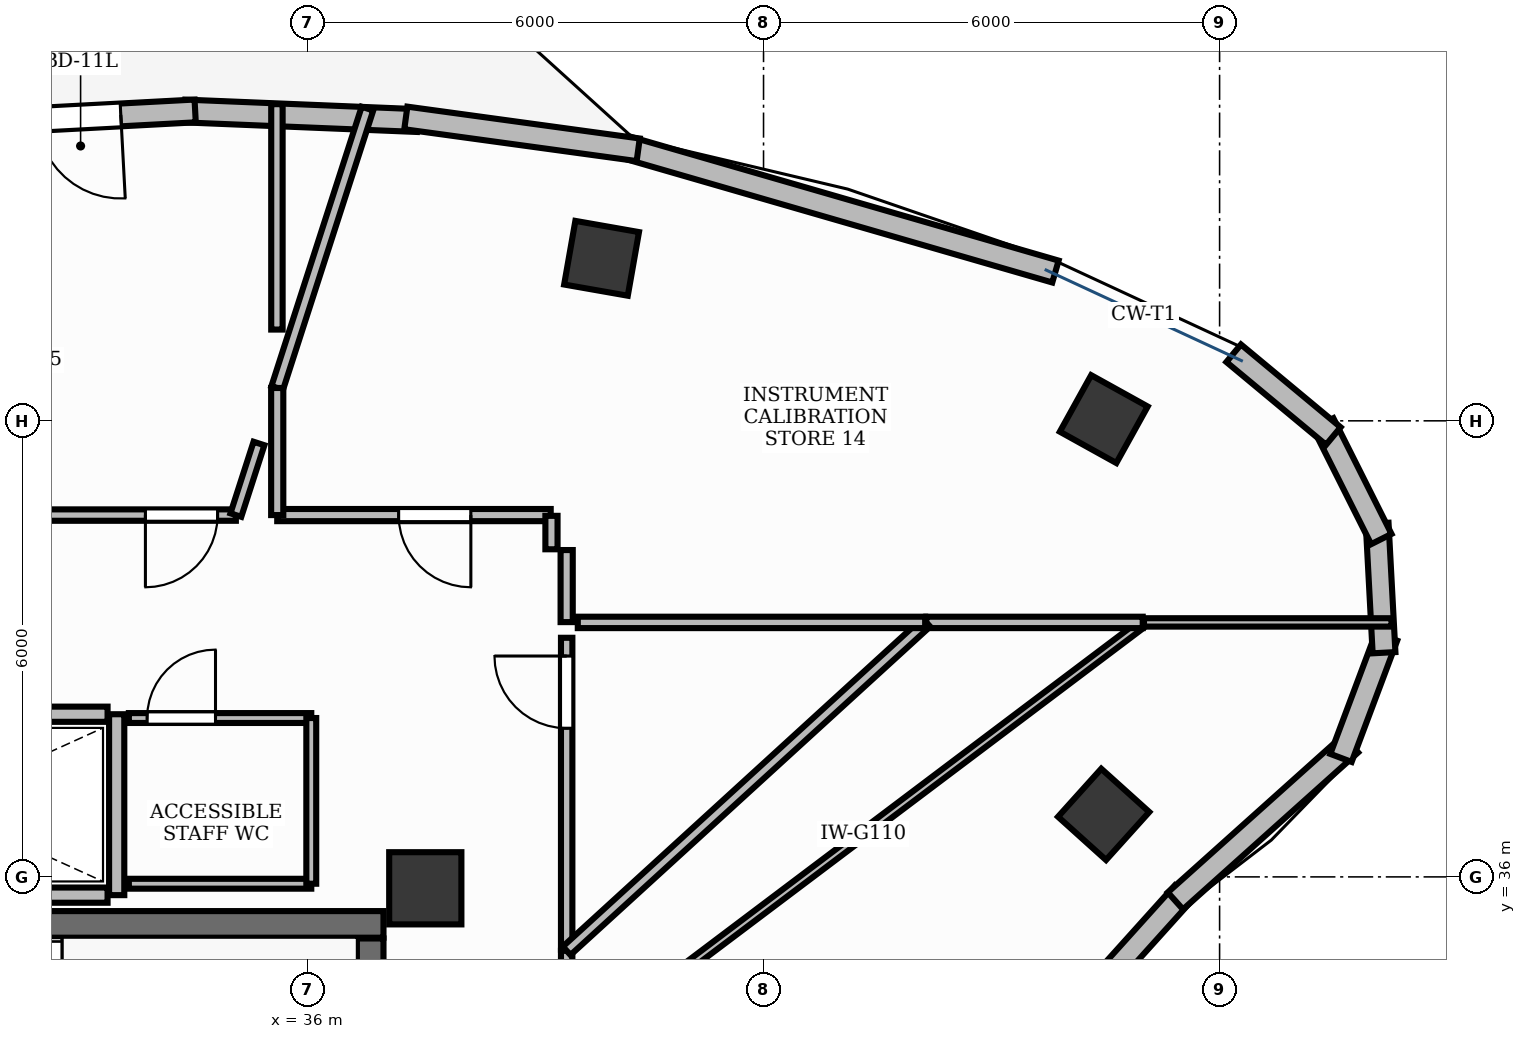
"""IFC4 building model, lengths in metres.
Left out: names, types, materials, properties, quantities, classifications, styles, units other than length and angle.
Written with IfcOpenShell. Run it as: python <this file> out.ifc"""

import sys

from ifc_helpers import new_model, si_unit, direction, frame, frame_2d, origin, origin_2d, place, context, subcontext, project, spatial, rectangle, extrude, element, fill, save


model = new_model("IFC4")
c1 = context("Model", 3, precision=1e-05, world=origin(), true_north=direction((0.0, 1.0)))
c2 = subcontext(c1, "Body", "Model", "MODEL_VIEW")
j1 = project(units=[si_unit("LENGTHUNIT", "METRE"), si_unit("PLANEANGLEUNIT", "RADIAN")], contexts=[c1])
p1 = place(None, origin())
s1 = spatial("IfcSite", under=j1, at=p1, CompositionType="ELEMENT")
p2 = place(p1, origin())
s2 = spatial("IfcBuilding", under=s1, at=p2, CompositionType="ELEMENT")
p3 = place(p2, frame((0.0, 0.0, 291.0)))
s3 = spatial("IfcBuildingStorey", under=s2, at=p3, CompositionType="ELEMENT", Elevation=291.0)
p4 = place(p3, frame((28.852, 35.375, 0.0), z_axis=(0.0, 0.0, 1.0), x_axis=(1.0, 0.0, 0.0)))
e1 = element("IfcWall", 1, at=p4, inside=s3, PredefinedType="SHEAR", context=c2, shape_type="SweptSolid", body=[
    extrude(rectangle(XDim=8.148, YDim=0.35, at=frame_2d((4.074, 0.0))), origin(), (0.0, 0.0, 1.0), 6.3),
])
p5 = place(p3, frame((36.825, 32.11, 0.0), z_axis=(0.0, 0.0, 1.0), x_axis=(0.0, 1.0, 0.0)))
e2 = element("IfcWall", 2, at=p5, inside=s3, PredefinedType="SHEAR", context=c2, shape_type="SweptSolid", body=[
    extrude(rectangle(XDim=3.08, YDim=0.35, at=frame_2d((1.54, 0.0))), origin(), (0.0, 0.0, 1.0), 6.3),
])
p6 = place(p3, frame((37.55, 35.85, -0.0), z_axis=(0.0, 0.0, 1.0), x_axis=(1.0, 0.0, 0.0)))
e3 = element("IfcColumn", 3, at=p6, inside=s3, PredefinedType="PILASTER", context=c2, shape_type="SweptSolid", body=[
    extrude(rectangle(XDim=0.95, YDim=0.95, at=origin_2d()), origin(), (0.0, 0.0, 1.0), 6.301),
])
for number, where, z_axis, x_axis in (
    (4, (46.476, 42.023, -0.0), (0.0, 0.0, 1.0), (-0.875, 0.485, 0.0)),
    (5, (39.869, 44.138, -0.0), (0.0, 0.0, 1.0), (-0.985, 0.173, 0.0)),
    (6, (46.475, 36.823, -0.0), (0.0, 0.0, 1.0), (0.669, 0.743, 0.0)),
):
    element("IfcColumn", number, at=place(p3, frame(where, z_axis=z_axis, x_axis=x_axis)), inside=s3, PredefinedType="COLUMN", context=c2, shape_type="SweptSolid", body=[
        extrude(rectangle(XDim=0.85, YDim=0.85, at=origin_2d()), origin(), (0.0, 0.0, 1.0), 6.301),
    ])
p7 = place(p3, frame((37.446, 45.95, 0.0), z_axis=(0.0, 0.0, 1.0), x_axis=(-0.999155735102, 0.041083050186, 0.0)))
e7 = element("IfcWall", 7, at=p7, inside=s3, PredefinedType="STANDARD", context=c2, shape_type="SweptSolid", body=[
    extrude(rectangle(XDim=3.061, YDim=0.3, at=frame_2d((1.53, 0.0))), origin(), (0.0, 0.0, 1.0), 6.3),
])
p8 = place(p3, frame((34.522, 46.077, 0.0), z_axis=(0.0, 0.0, 1.0), x_axis=(-0.998578313912, -0.053304324252, 0.0)))
e8 = element("IfcWall", 8, at=p8, inside=s3, PredefinedType="STANDARD", context=c2, shape_type="SweptSolid", body=[
    extrude(rectangle(XDim=3.06, YDim=0.3, at=frame_2d((1.53, 0.0))), origin(), (0.0, 0.0, 1.0), 6.3),
])
p9 = place(p8, frame((0.98, 0.0, 0.0)))
e9 = element("IfcOpeningElement", 9, at=p9, cuts=e8, PredefinedType="OPENING", context=c2, shape_type="SweptSolid", body=[
    extrude(rectangle(XDim=1.1, YDim=2.15, at=frame_2d((0.55, 1.075))), frame((0.0, 0.165, 0.0), z_axis=(0.0, -1.0, 0.0), x_axis=(1.0, 0.0, 0.0)), (0.0, 0.0, 1.0), 0.33),
])
p10 = place(p3, frame((45.841, 43.964, 0.0), z_axis=(0.0, 0.0, 1.0), x_axis=(-0.960603242608, 0.277923389247, 0.0)))
e10 = element("IfcWall", 10, at=p10, inside=s3, PredefinedType="STANDARD", context=c2, shape_type="SweptSolid", body=[
    extrude(rectangle(XDim=5.898, YDim=0.3, at=frame_2d((2.949, 0.0))), origin(), (0.0, 0.0, 1.0), 6.3),
])
p11 = place(p3, frame((40.351, 45.566, 0.0), z_axis=(0.0, 0.0, 1.0), x_axis=(-0.990752495137, 0.135681588211, 0.0)))
e11 = element("IfcWall", 11, at=p11, inside=s3, PredefinedType="STANDARD", context=c2, shape_type="SweptSolid", body=[
    extrude(rectangle(XDim=3.086, YDim=0.3, at=frame_2d((1.543, 0.0))), origin(), (0.0, 0.0, 1.0), 6.3),
])
p12 = place(p3, frame((45.548, 33.596, 0.0), z_axis=(0.0, 0.0, 1.0), x_axis=(0.669166006669, 0.743112949368, 0.0)))
e12 = element("IfcWall", 12, at=p12, inside=s3, PredefinedType="STANDARD", context=c2, shape_type="SweptSolid", body=[
    extrude(rectangle(XDim=2.948, YDim=0.3, at=frame_2d((1.474, 0.0))), origin(), (0.0, 0.0, 1.0), 6.3),
])
p13 = place(p3, frame((47.419, 35.684, 0.0), z_axis=(0.0, 0.0, 1.0), x_axis=(0.744720921046, 0.667376018266, 0.0)))
e13 = element("IfcWall", 13, at=p13, inside=s3, PredefinedType="STANDARD", context=c2, shape_type="SweptSolid", body=[
    extrude(rectangle(XDim=3.094, YDim=0.3, at=frame_2d((1.547, 0.0))), origin(), (0.0, 0.0, 1.0), 6.3),
])
for number, where, z_axis, x_axis in (
    (14, (49.597, 37.565, 0.0), (0.0, 0.0, 1.0), (0.351, 0.936, 0.0)),
    (15, (50.163, 38.949, 0.0), (0.0, 0.0, 1.0), (-0.053, 0.999, 0.0)),
):
    element("IfcWall", number, at=place(p3, frame(where, z_axis=z_axis, x_axis=x_axis)), inside=s3, PredefinedType="STANDARD", context=c2, shape_type="SweptSolid", body=[
        extrude(rectangle(XDim=1.704, YDim=0.3, at=frame_2d((0.852, 0.0))), origin(), (0.0, 0.0, 1.0), 6.3),
    ])
for number, where, z_axis, x_axis in (
    (16, (50.128, 40.445, 0.0), (0.0, 0.0, 1.0), (-0.449, 0.894, 0.0)),
    (17, (49.496, 41.8, 0.0), (0.0, 0.0, 1.0), (-0.769, 0.639, 0.0)),
):
    element("IfcWall", number, at=place(p3, frame(where, z_axis=z_axis, x_axis=x_axis)), inside=s3, PredefinedType="STANDARD", context=c2, shape_type="SweptSolid", body=[
        extrude(rectangle(XDim=1.704, YDim=0.3, at=frame_2d((0.852, 0.0))), origin(), (0.0, 0.0, 1.0), 6.3),
    ])
p14 = place(p3, frame((33.49, 35.76, 0.0), z_axis=(0.0, 0.0, 1.0), x_axis=(0.0, 1.0, 0.0)))
e18 = element("IfcWall", 18, at=p14, inside=s3, PredefinedType="PARTITIONING", context=c2, shape_type="SweptSolid", body=[
    extrude(rectangle(XDim=2.38, YDim=0.2, at=frame_2d((1.19, 0.0))), origin(), (0.0, 0.0, 1.0), 4.61),
])
for number, where, z_axis, x_axis in (
    (19, (28.8, 35.76, 0.0), (0.0, 0.0, 1.0), (1.0, 0.0, 0.0)),
    (20, (28.8, 38.14, 0.0), (0.0, 0.0, 1.0), (1.0, 0.0, 0.0)),
):
    element("IfcWall", number, at=place(p3, frame(where, z_axis=z_axis, x_axis=x_axis)), inside=s3, PredefinedType="PARTITIONING", context=c2, shape_type="SweptSolid", body=[
        extrude(rectangle(XDim=4.57, YDim=0.2, at=frame_2d((2.285, 0.0))), origin(), (0.0, 0.0, 1.0), 4.61),
    ])
p15 = place(p3, frame((33.65, 38.09, 0.0), z_axis=(0.0, 0.0, 1.0), x_axis=(1.0, 0.0, 0.0)))
e21 = element("IfcWall", 21, at=p15, inside=s3, PredefinedType="PARTITIONING", context=c2, shape_type="SweptSolid", body=[
    extrude(rectangle(XDim=2.4, YDim=0.13, at=frame_2d((1.2, 0.0))), origin(), (0.0, 0.0, 1.0), 4.61),
])
p16 = place(p15, frame((0.24, 0.0, 0.0)))
e22 = element("IfcOpeningElement", 22, at=p16, cuts=e21, PredefinedType="OPENING", context=c2, shape_type="SweptSolid", body=[
    extrude(rectangle(XDim=0.9, YDim=2.15, at=frame_2d((0.45, 1.075))), frame((0.0, 0.08, 0.0), z_axis=(0.0, -1.0, 0.0), x_axis=(1.0, 0.0, 0.0)), (0.0, 0.0, 1.0), 0.16),
])
p17 = place(p3, frame((39.41, 33.637, 0.0), z_axis=(0.0, 0.0, 1.0), x_axis=(0.0, 1.0, 0.0)))
e23 = element("IfcWall", 23, at=p17, inside=s3, PredefinedType="PARTITIONING", context=c2, shape_type="SweptSolid", body=[
    extrude(rectangle(XDim=1.391, YDim=0.15, at=frame_2d((0.695, 0.0))), origin(), (0.0, 0.0, 1.0), 4.61),
])
p18 = place(p17, frame((0.21, 0.0, 0.0)))
e24 = element("IfcOpeningElement", 24, at=p18, cuts=e23, PredefinedType="OPENING", context=c2, shape_type="SweptSolid", body=[
    extrude(rectangle(XDim=0.95, YDim=2.15, at=frame_2d((0.475, 1.075))), frame((0.0, 0.09, 0.0), z_axis=(0.0, -1.0, 0.0), x_axis=(1.0, 0.0, 0.0)), (0.0, 0.0, 1.0), 0.18),
])
p19 = place(p3, frame((39.41, 35.041, 0.0), z_axis=(0.0, 0.0, 1.0), x_axis=(0.0, 1.0, 0.0)))
e25 = element("IfcWall", 25, at=p19, inside=s3, PredefinedType="PARTITIONING", context=c2, shape_type="SweptSolid", body=[
    extrude(rectangle(XDim=4.104, YDim=0.15, at=frame_2d((2.052, 0.0))), origin(), (0.0, 0.0, 1.0), 4.61),
])
p20 = place(p19, frame((2.914, 0.0, 0.0)))
e26 = element("IfcOpeningElement", 26, at=p20, cuts=e25, PredefinedType="OPENING", context=c2, shape_type="SweptSolid", body=[
    extrude(rectangle(XDim=0.95, YDim=2.15, at=frame_2d((0.475, 1.075))), frame((0.0, 0.09, 0.0), z_axis=(0.0, -1.0, 0.0), x_axis=(1.0, 0.0, 0.0)), (0.0, 0.0, 1.0), 0.18),
])
p21 = place(p3, frame((39.2, 40.76, 0.0), z_axis=(0.0, 0.0, 1.0), x_axis=(-1.0, 0.0, 0.0)))
e27 = element("IfcWall", 27, at=p21, inside=s3, PredefinedType="PARTITIONING", context=c2, shape_type="SweptSolid", body=[
    extrude(rectangle(XDim=3.598, YDim=0.16, at=frame_2d((1.799, 0.0))), origin(), (0.0, 0.0, 1.0), 4.61),
])
p22 = place(p21, frame((1.051, 0.0, 0.0)))
e28 = element("IfcOpeningElement", 28, at=p22, cuts=e27, PredefinedType="OPENING", context=c2, shape_type="SweptSolid", body=[
    extrude(rectangle(XDim=0.95, YDim=2.15, at=frame_2d((0.475, 1.075))), frame((0.0, 0.095, 0.0), z_axis=(0.0, -1.0, 0.0), x_axis=(1.0, 0.0, 0.0)), (0.0, 0.0, 1.0), 0.19),
])
p23 = place(p3, frame((35.058, 40.76, 0.0), z_axis=(0.0, 0.0, 1.0), x_axis=(-1.0, 0.0, 0.0)))
e29 = element("IfcWall", 29, at=p23, inside=s3, PredefinedType="PARTITIONING", context=c2, shape_type="SweptSolid", body=[
    extrude(rectangle(XDim=12.908, YDim=0.15, at=frame_2d((6.454, 0.0))), origin(), (0.0, 0.0, 1.0), 4.61),
])
p24 = place(p23, frame((0.24, 0.0, 0.0)))
e30 = element("IfcOpeningElement", 30, at=p24, cuts=e29, PredefinedType="OPENING", context=c2, shape_type="SweptSolid", body=[
    extrude(rectangle(XDim=0.95, YDim=2.15, at=frame_2d((0.475, 1.075))), frame((0.0, 0.09, 0.0), z_axis=(0.0, -1.0, 0.0), x_axis=(1.0, 0.0, 0.0)), (0.0, 0.0, 1.0), 0.18),
])
p25 = place(p3, frame((36.05, 35.91, 0.0), z_axis=(0.0, 0.0, 1.0), x_axis=(-1.0, 0.0, 0.0)))
e31 = element("IfcWall", 31, at=p25, inside=s3, PredefinedType="PARTITIONING", context=c2, shape_type="SweptSolid", body=[
    extrude(rectangle(XDim=2.4, YDim=0.13, at=frame_2d((1.2, 0.0))), origin(), (0.0, 0.0, 1.0), 4.61),
])
p26 = place(p3, frame((36.05, 38.09, 0.0), z_axis=(0.0, 0.0, 1.0), x_axis=(0.0, -1.0, 0.0)))
e32 = element("IfcWall", 32, at=p26, inside=s3, PredefinedType="PARTITIONING", context=c2, shape_type="SweptSolid", body=[
    extrude(rectangle(XDim=2.18, YDim=0.13, at=frame_2d((1.09, 0.0))), origin(), (0.0, 0.0, 1.0), 4.61),
])
p27 = place(p3, frame((39.41, 33.625, 0.0), z_axis=(0.0, 0.0, 1.0), x_axis=(0.798636330538, 0.601813934323, 0.0)))
e33 = element("IfcWall", 33, at=p27, inside=s3, PredefinedType="MOVABLE", context=c2, shape_type="SweptSolid", body=[
    extrude(rectangle(XDim=9.51, YDim=0.11, at=frame_2d((4.755, 0.0))), origin(), (0.0, 0.0, 1.0), 4.61),
])
p28 = place(p3, frame((47.005, 39.348, 0.0), z_axis=(0.0, 0.0, 1.0), x_axis=(1.0, 0.0, 0.0)))
e34 = element("IfcWall", 34, at=p28, inside=s3, PredefinedType="MOVABLE", context=c2, shape_type="SweptSolid", body=[
    extrude(rectangle(XDim=3.257, YDim=0.11, at=frame_2d((1.628, 0.0))), origin(), (0.0, 0.0, 1.0), 4.61),
])
p29 = place(p3, frame((44.141, 39.348, 0.0), z_axis=(0.0, 0.0, 1.0), x_axis=(1.0, 0.0, 0.0)))
e35 = element("IfcWall", 35, at=p29, inside=s3, PredefinedType="PARTITIONING", context=c2, shape_type="SweptSolid", body=[
    extrude(rectangle(XDim=2.847, YDim=0.15, at=frame_2d((1.424, 0.0))), origin(), (0.0, 0.0, 1.0), 4.61),
])
p30 = place(p3, frame((39.41, 35.028, 0.0), z_axis=(0.0, 0.0, 1.0), x_axis=(0.73848136911, 0.674273881651, 0.0)))
e36 = element("IfcWall", 36, at=p30, inside=s3, PredefinedType="PARTITIONING", context=c2, shape_type="SweptSolid", body=[
    extrude(rectangle(XDim=6.407, YDim=0.15, at=frame_2d((3.204, 0.0))), origin(), (0.0, 0.0, 1.0), 4.61),
])
p31 = place(p3, frame((39.556, 39.348, 0.0), z_axis=(0.0, 0.0, 1.0), x_axis=(1.0, 0.0, 0.0)))
e37 = element("IfcWall", 37, at=p31, inside=s3, PredefinedType="PARTITIONING", context=c2, shape_type="SweptSolid", body=[
    extrude(rectangle(XDim=4.57, YDim=0.15, at=frame_2d((2.285, 0.0))), origin(), (0.0, 0.0, 1.0), 4.61),
])
p32 = place(p3, frame((35.602, 42.432, 0.0), z_axis=(0.0, 0.0, 1.0), x_axis=(0.307338900837, 0.95160012612, 0.0)))
e38 = element("IfcWall", 38, at=p32, inside=s3, PredefinedType="PARTITIONING", context=c2, shape_type="SweptSolid", body=[
    extrude(rectangle(XDim=3.862, YDim=0.16, at=frame_2d((1.931, 0.0))), origin(), (0.0, 0.0, 1.0), 4.61),
])
p33 = place(p3, frame((39.41, 39.352, 0.0), z_axis=(0.0, 0.0, 1.0), x_axis=(0.0, 1.0, 0.0)))
e39 = element("IfcWall", 39, at=p33, inside=s3, PredefinedType="PARTITIONING", context=c2, shape_type="SweptSolid", body=[
    extrude(rectangle(XDim=0.948, YDim=0.16, at=frame_2d((0.474, 0.0))), origin(), (0.0, 0.0, 1.0), 4.61),
])
p34 = place(p3, frame((39.21, 40.31, 0.0), z_axis=(0.0, 0.0, 1.0), x_axis=(0.0, 1.0, 0.0)))
e40 = element("IfcWall", 40, at=p34, inside=s3, PredefinedType="PARTITIONING", context=c2, shape_type="SweptSolid", body=[
    extrude(rectangle(XDim=0.44, YDim=0.16, at=frame_2d((0.22, 0.0))), origin(), (0.0, 0.0, 1.0), 4.61),
])
p35 = place(p3, frame((35.602, 40.76, 0.0), z_axis=(0.0, 0.0, 1.0), x_axis=(0.0, 1.0, 0.0)))
e41 = element("IfcWall", 41, at=p35, inside=s3, PredefinedType="PARTITIONING", context=c2, shape_type="SweptSolid", body=[
    extrude(rectangle(XDim=1.672, YDim=0.16, at=frame_2d((0.836, 0.0))), origin(), (0.0, 0.0, 1.0), 4.61),
])
p36 = place(p3, frame((35.598, 46.166, 0.0), z_axis=(0.0, 0.0, 1.0), x_axis=(0.0, -1.0, 0.0)))
e42 = element("IfcWall", 42, at=p36, inside=s3, PredefinedType="PARTITIONING", context=c2, shape_type="SweptSolid", body=[
    extrude(rectangle(XDim=2.965, YDim=0.15, at=frame_2d((1.483, 0.0))), origin(), (0.0, 0.0, 1.0), 4.61),
])
p37 = place(p3, frame((35.362, 41.702, 0.0), z_axis=(0.0, 0.0, 1.0), x_axis=(-0.307334271647, -0.9516016212, 0.0)))
e43 = element("IfcWall", 43, at=p37, inside=s3, PredefinedType="PARTITIONING", context=c2, shape_type="SweptSolid", body=[
    extrude(rectangle(XDim=0.99, YDim=0.15, at=frame_2d((0.495, 0.0))), origin(), (0.0, 0.0, 1.0), 4.61),
])
p38 = place(p9, origin())
e44 = element("IfcDoor", 44, at=p38, inside=s3, OperationType="SINGLE_SWING_LEFT", PredefinedType="DOOR", context=c2, shape_type="SweptSolid", body=[
    extrude(rectangle(XDim=1.1, YDim=2.15, at=frame_2d((0.55, 1.075))), frame((0.0, 0.025, 0.0), z_axis=(0.0, -1.0, 0.0), x_axis=(1.0, 0.0, 0.0)), (0.0, 0.0, 1.0), 0.05),
])
fill(e9, e44)
p39 = place(p16, origin())
e45 = element("IfcDoor", 45, at=p39, inside=s3, OperationType="SINGLE_SWING_RIGHT", PredefinedType="DOOR", context=c2, shape_type="SweptSolid", body=[
    extrude(rectangle(XDim=0.9, YDim=2.15, at=frame_2d((0.45, 1.075))), frame((0.0, 0.025, 0.0), z_axis=(0.0, -1.0, 0.0), x_axis=(1.0, 0.0, 0.0)), (0.0, 0.0, 1.0), 0.05),
])
fill(e22, e45)
p40 = place(p20, origin())
e46 = element("IfcDoor", 46, at=p40, inside=s3, OperationType="SINGLE_SWING_RIGHT", PredefinedType="DOOR", context=c2, shape_type="SweptSolid", body=[
    extrude(rectangle(XDim=0.95, YDim=2.15, at=frame_2d((0.475, 1.075))), frame((0.0, 0.025, 0.0), z_axis=(0.0, -1.0, 0.0), x_axis=(1.0, 0.0, 0.0)), (0.0, 0.0, 1.0), 0.05),
])
fill(e26, e46)
p41 = place(p22, origin())
e47 = element("IfcDoor", 47, at=p41, inside=s3, OperationType="SINGLE_SWING_LEFT", PredefinedType="DOOR", context=c2, shape_type="SweptSolid", body=[
    extrude(rectangle(XDim=0.95, YDim=2.15, at=frame_2d((0.475, 1.075))), frame((0.0, 0.025, 0.0), z_axis=(0.0, -1.0, 0.0), x_axis=(1.0, 0.0, 0.0)), (0.0, 0.0, 1.0), 0.05),
])
fill(e28, e47)
p42 = place(p24, origin())
e48 = element("IfcDoor", 48, at=p42, inside=s3, OperationType="SINGLE_SWING_RIGHT", PredefinedType="DOOR", context=c2, shape_type="SweptSolid", body=[
    extrude(rectangle(XDim=0.95, YDim=2.15, at=frame_2d((0.475, 1.075))), frame((0.0, 0.025, 0.0), z_axis=(0.0, -1.0, 0.0), x_axis=(1.0, 0.0, 0.0)), (0.0, 0.0, 1.0), 0.05),
])
fill(e30, e48)
save(model, sys.argv[1])
